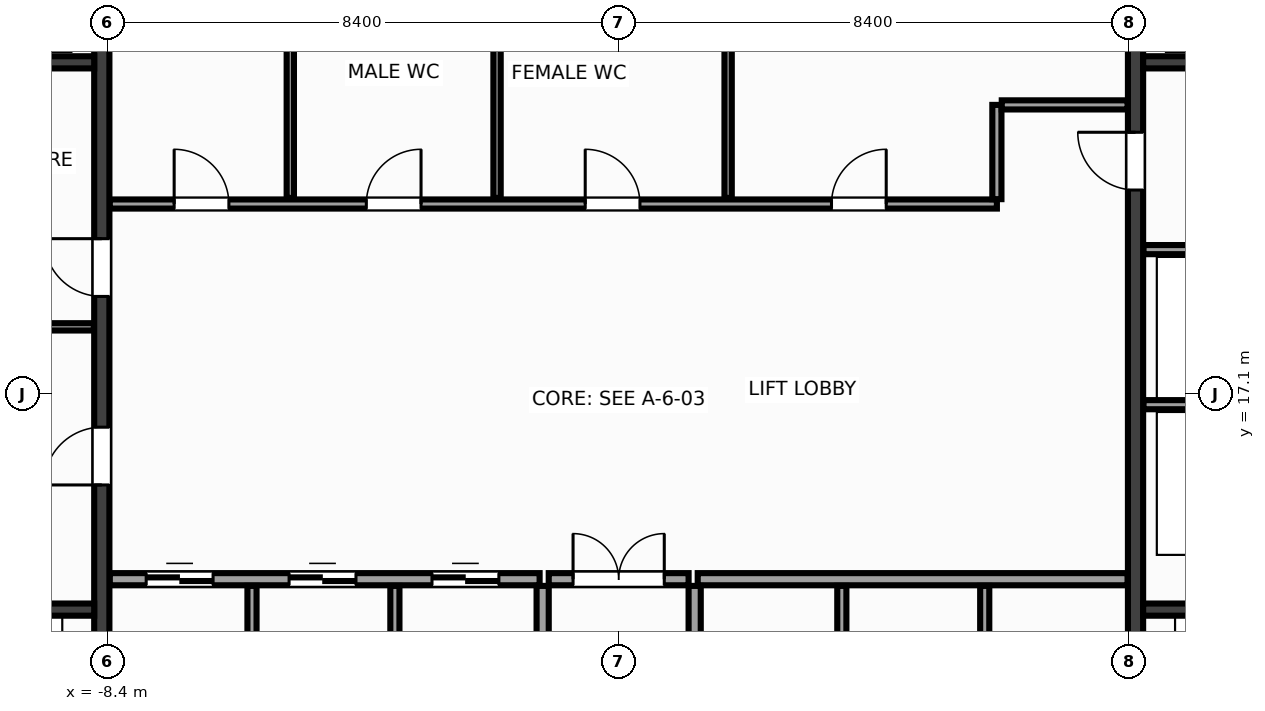
"""IFC4 building model, lengths in metres.
Left out: names, types, materials, properties, quantities, classifications, styles, units other than length and angle.
Written with IfcOpenShell. Run it as: python <this file> out.ifc"""

import sys

from ifc_helpers import new_model, si_unit, direction, frame, frame_2d, origin, place, context, subcontext, project, spatial, rectangle, extrude, source, transform, mapped, element, fill, save


model = new_model("IFC4")
c1 = context("Model", 3, precision=1e-05, world=origin(), true_north=direction((0.0, 1.0)))
c2 = subcontext(c1, "Body", "Model", "MODEL_VIEW")
j1 = project(units=[si_unit("LENGTHUNIT", "METRE"), si_unit("PLANEANGLEUNIT", "RADIAN")], contexts=[c1])
p1 = place(None, origin())
s1 = spatial("IfcSite", under=j1, at=p1, CompositionType="ELEMENT")
p2 = place(p1, origin())
s2 = spatial("IfcBuilding", under=s1, at=p2, CompositionType="ELEMENT")
p3 = place(p2, frame((0.0, 0.0, 38.0)))
s3 = spatial("IfcBuildingStorey", under=s2, at=p3, CompositionType="ELEMENT", Elevation=38.0)
m1 = source(origin(), c2, "Body", "SweptSolid", [
    extrude(rectangle(XDim=12.8, YDim=0.25, at=frame_2d((6.4, 0.0))), origin(), (0.0, 0.0, 1.0), 3.6),
])
p4 = place(p3, frame((-8.5, 10.6, 0.0), z_axis=(0.0, 0.0, 1.0), x_axis=(0.0, 1.0, 0.0)))
e1 = element("IfcWall", 1, at=p4, inside=s3, PredefinedType="SHEAR", context=c2, shape_type="MappedRepresentation", body=[
    mapped(m1, transform((0.0, 0.0, 0.0), x_axis=(1.0, 0.0, 0.0), y_axis=(0.0, 1.0, 0.0), z_axis=(0.0, 0.0, 1.0), scale=1.0)),
])
p5 = place(p4, frame((5.0, 0.0, 0.0)))
e2 = element("IfcOpeningElement", 2, at=p5, cuts=e1, PredefinedType="OPENING", context=c2, shape_type="SweptSolid", body=[
    extrude(rectangle(XDim=0.95, YDim=2.15, at=frame_2d((0.475, 1.075))), frame((0.0, 0.137, 0.0), z_axis=(0.0, -1.0, 0.0), x_axis=(1.0, 0.0, 0.0)), (0.0, 0.0, 1.0), 0.274),
])
p6 = place(p4, frame((8.1, 0.0, 0.0)))
e3 = element("IfcOpeningElement", 3, at=p6, cuts=e1, PredefinedType="OPENING", context=c2, shape_type="SweptSolid", body=[
    extrude(rectangle(XDim=0.95, YDim=2.15, at=frame_2d((0.475, 1.075))), frame((0.0, 0.137, 0.0), z_axis=(0.0, -1.0, 0.0), x_axis=(1.0, 0.0, 0.0)), (0.0, 0.0, 1.0), 0.274),
])
p7 = place(p3, frame((8.5, 10.6, 0.0), z_axis=(0.0, 0.0, 1.0), x_axis=(0.0, 1.0, 0.0)))
e4 = element("IfcWall", 4, at=p7, inside=s3, PredefinedType="SHEAR", context=c2, shape_type="MappedRepresentation", body=[
    mapped(m1, transform((0.0, 0.0, 0.0), x_axis=(1.0, 0.0, 0.0), y_axis=(0.0, 1.0, 0.0), z_axis=(0.0, 0.0, 1.0), scale=1.0)),
])
p8 = place(p7, frame((9.85, 0.0, 0.0)))
e5 = element("IfcOpeningElement", 5, at=p8, cuts=e4, PredefinedType="OPENING", context=c2, shape_type="SweptSolid", body=[
    extrude(rectangle(XDim=0.95, YDim=2.15, at=frame_2d((0.475, 1.075))), frame((0.0, 0.137, 0.0), z_axis=(0.0, -1.0, 0.0), x_axis=(1.0, 0.0, 0.0)), (0.0, 0.0, 1.0), 0.274),
])
m2 = source(origin(), c2, "Body", "SweptSolid", [
    extrude(rectangle(XDim=2.825, YDim=0.2, at=frame_2d((1.413, 0.0))), origin(), (0.0, 0.0, 1.0), 3.6),
])
for number, where, z_axis, x_axis in (
    (6, (-11.45, 13.55, 0.0), (0.0, 0.0, 1.0), (1.0, 0.0, 0.0)),
    (7, (8.625, 13.55, 0.0), (0.0, 0.0, 1.0), (1.0, 0.0, 0.0)),
):
    element("IfcWall", number, at=place(p3, frame(where, z_axis=z_axis, x_axis=x_axis)), inside=s3, PredefinedType="SHEAR", context=c2, shape_type="MappedRepresentation", body=[
        mapped(m2, transform((0.0, 0.0, 0.0), x_axis=(1.0, 0.0, 0.0), y_axis=(0.0, 1.0, 0.0), z_axis=(0.0, 0.0, 1.0), scale=1.0)),
    ])
m3 = source(origin(), c2, "Body", "SweptSolid", [
    extrude(rectangle(XDim=3.02, YDim=0.2, at=frame_2d((1.51, 0.0))), origin(), (0.0, 0.0, 1.0), 3.6),
])
for number, where, z_axis, x_axis in (
    (8, (-11.645, 22.55, 0.0), (0.0, 0.0, 1.0), (1.0, 0.0, 0.0)),
    (9, (8.625, 22.55, 0.0), (0.0, 0.0, 1.0), (1.0, 0.0, 0.0)),
):
    element("IfcWall", number, at=place(p3, frame(where, z_axis=z_axis, x_axis=x_axis)), inside=s3, PredefinedType="SHEAR", context=c2, shape_type="MappedRepresentation", body=[
        mapped(m3, transform((0.0, 0.0, 0.0), x_axis=(1.0, 0.0, 0.0), y_axis=(0.0, 1.0, 0.0), z_axis=(0.0, 0.0, 1.0), scale=1.0)),
    ])
m4 = source(origin(), c2, "Body", "SweptSolid", [
    extrude(rectangle(XDim=3.01, YDim=0.12, at=frame_2d((1.505, 0.0))), origin(), (0.0, 0.0, 1.0), 3.36),
])
p9 = place(p3, frame((-11.64, 18.2, 0.0), z_axis=(0.0, 0.0, 1.0), x_axis=(1.0, 0.0, 0.0)))
e10 = element("IfcWall", 10, at=p9, inside=s3, PredefinedType="PARTITIONING", context=c2, shape_type="MappedRepresentation", body=[
    mapped(m4, transform((0.0, 0.0, 0.0), x_axis=(1.0, 0.0, 0.0), y_axis=(0.0, 1.0, 0.0), z_axis=(0.0, 0.0, 1.0), scale=1.0)),
])
m5 = source(origin(), c2, "Body", "SweptSolid", [
    extrude(rectangle(XDim=3.01, YDim=0.15, at=frame_2d((1.505, 0.0))), origin(), (0.0, 0.0, 1.0), 3.36),
])
for number, where, z_axis, x_axis in (
    (11, (8.63, 16.92, 0.0), (0.0, 0.0, 1.0), (1.0, 0.0, 0.0)),
    (12, (8.63, 19.47, 0.0), (0.0, 0.0, 1.0), (1.0, 0.0, 0.0)),
):
    element("IfcWall", number, at=place(p3, frame(where, z_axis=z_axis, x_axis=x_axis)), inside=s3, PredefinedType="PARTITIONING", context=c2, shape_type="MappedRepresentation", body=[
        mapped(m5, transform((0.0, 0.0, 0.0), x_axis=(1.0, 0.0, 0.0), y_axis=(0.0, 1.0, 0.0), z_axis=(0.0, 0.0, 1.0), scale=1.0)),
    ])
m6 = source(origin(), c2, "Body", "SweptSolid", [
    extrude(rectangle(XDim=7.07, YDim=0.2, at=frame_2d((3.535, 0.0))), origin(), (0.0, 0.0, 1.0), 3.36),
])
p10 = place(p3, frame((-8.37, 14.05, 0.0), z_axis=(0.0, 0.0, 1.0), x_axis=(1.0, 0.0, 0.0)))
e13 = element("IfcWall", 13, at=p10, inside=s3, PredefinedType="PARTITIONING", context=c2, shape_type="MappedRepresentation", body=[
    mapped(m6, transform((0.0, 0.0, 0.0), x_axis=(1.0, 0.0, 0.0), y_axis=(0.0, 1.0, 0.0), z_axis=(0.0, 0.0, 1.0), scale=1.0)),
])
p11 = place(p10, frame((0.6, 0.0, 0.0)))
e14 = element("IfcOpeningElement", 14, at=p11, cuts=e13, PredefinedType="OPENING", context=c2, shape_type="SweptSolid", body=[
    extrude(rectangle(XDim=1.1, YDim=2.15, at=frame_2d((0.55, 1.075))), frame((0.0, 0.112, 0.0), z_axis=(0.0, -1.0, 0.0), x_axis=(1.0, 0.0, 0.0)), (0.0, 0.0, 1.0), 0.224),
])
p12 = place(p10, frame((2.95, 0.0, 0.0)))
e15 = element("IfcOpeningElement", 15, at=p12, cuts=e13, PredefinedType="OPENING", context=c2, shape_type="SweptSolid", body=[
    extrude(rectangle(XDim=1.1, YDim=2.15, at=frame_2d((0.55, 1.075))), frame((0.0, 0.112, 0.0), z_axis=(0.0, -1.0, 0.0), x_axis=(1.0, 0.0, 0.0)), (0.0, 0.0, 1.0), 0.224),
])
p13 = place(p10, frame((5.3, 0.0, 0.0)))
e16 = element("IfcOpeningElement", 16, at=p13, cuts=e13, PredefinedType="OPENING", context=c2, shape_type="SweptSolid", body=[
    extrude(rectangle(XDim=1.1, YDim=2.15, at=frame_2d((0.55, 1.075))), frame((0.0, 0.112, 0.0), z_axis=(0.0, -1.0, 0.0), x_axis=(1.0, 0.0, 0.0)), (0.0, 0.0, 1.0), 0.224),
])
p14 = place(p3, frame((1.3, 14.05, 0.0), z_axis=(0.0, 0.0, 1.0), x_axis=(1.0, 0.0, 0.0)))
e17 = element("IfcWall", 17, at=p14, inside=s3, PredefinedType="PARTITIONING", context=c2, shape_type="MappedRepresentation", body=[
    mapped(m6, transform((0.0, 0.0, 0.0), x_axis=(1.0, 0.0, 0.0), y_axis=(0.0, 1.0, 0.0), z_axis=(0.0, 0.0, 1.0), scale=1.0)),
])
m7 = source(origin(), c2, "Body", "SweptSolid", [
    extrude(rectangle(XDim=3.34, YDim=0.2, at=frame_2d((1.67, 0.0))), origin(), (0.0, 0.0, 1.0), 3.36),
])
for number, where, z_axis, x_axis in (
    (18, (-1.25, 10.6, 0.0), (0.0, 0.0, 1.0), (0.0, 1.0, 0.0)),
    (19, (1.25, 10.6, 0.0), (0.0, 0.0, 1.0), (0.0, 1.0, 0.0)),
):
    element("IfcWall", number, at=place(p3, frame(where, z_axis=z_axis, x_axis=x_axis)), inside=s3, PredefinedType="PARTITIONING", context=c2, shape_type="MappedRepresentation", body=[
        mapped(m7, transform((0.0, 0.0, 0.0), x_axis=(1.0, 0.0, 0.0), y_axis=(0.0, 1.0, 0.0), z_axis=(0.0, 0.0, 1.0), scale=1.0)),
    ])
m8 = source(origin(), c2, "Body", "SweptSolid", [
    extrude(rectangle(XDim=2.3, YDim=0.2, at=frame_2d((1.15, 0.0))), origin(), (0.0, 0.0, 1.0), 3.36),
])
p15 = place(p3, frame((-1.15, 14.05, 0.0), z_axis=(0.0, 0.0, 1.0), x_axis=(1.0, 0.0, 0.0)))
e20 = element("IfcWall", 20, at=p15, inside=s3, PredefinedType="PARTITIONING", context=c2, shape_type="MappedRepresentation", body=[
    mapped(m8, transform((0.0, 0.0, 0.0), x_axis=(1.0, 0.0, 0.0), y_axis=(0.0, 1.0, 0.0), z_axis=(0.0, 0.0, 1.0), scale=1.0)),
])
p16 = place(p15, frame((0.4, 0.0, 0.0)))
e21 = element("IfcOpeningElement", 21, at=p16, cuts=e20, PredefinedType="OPENING", context=c2, shape_type="SweptSolid", body=[
    extrude(rectangle(XDim=1.5, YDim=2.2, at=frame_2d((0.75, 1.1))), frame((0.0, 0.112, 0.0), z_axis=(0.0, -1.0, 0.0), x_axis=(1.0, 0.0, 0.0)), (0.0, 0.0, 1.0), 0.224),
])
m9 = source(origin(), c2, "Body", "SweptSolid", [
    extrude(rectangle(XDim=14.59, YDim=0.15, at=frame_2d((7.295, 0.0))), origin(), (0.0, 0.0, 1.0), 3.36),
])
p17 = place(p3, frame((-8.37, 20.22, 0.0), z_axis=(0.0, 0.0, 1.0), x_axis=(1.0, 0.0, 0.0)))
e22 = element("IfcWall", 22, at=p17, inside=s3, PredefinedType="PARTITIONING", context=c2, shape_type="MappedRepresentation", body=[
    mapped(m9, transform((0.0, 0.0, 0.0), x_axis=(1.0, 0.0, 0.0), y_axis=(0.0, 1.0, 0.0), z_axis=(0.0, 0.0, 1.0), scale=1.0)),
])
p18 = place(p17, frame((1.06, 0.0, 0.0)))
e23 = element("IfcOpeningElement", 23, at=p18, cuts=e22, PredefinedType="OPENING", context=c2, shape_type="SweptSolid", body=[
    extrude(rectangle(XDim=0.9, YDim=2.15, at=frame_2d((0.45, 1.075))), frame((0.0, 0.087, 0.0), z_axis=(0.0, -1.0, 0.0), x_axis=(1.0, 0.0, 0.0)), (0.0, 0.0, 1.0), 0.174),
])
p19 = place(p17, frame((4.22, 0.0, 0.0)))
e24 = element("IfcOpeningElement", 24, at=p19, cuts=e22, PredefinedType="OPENING", context=c2, shape_type="SweptSolid", body=[
    extrude(rectangle(XDim=0.9, YDim=2.15, at=frame_2d((0.45, 1.075))), frame((0.0, 0.087, 0.0), z_axis=(0.0, -1.0, 0.0), x_axis=(1.0, 0.0, 0.0)), (0.0, 0.0, 1.0), 0.174),
])
p20 = place(p17, frame((7.82, 0.0, 0.0)))
e25 = element("IfcOpeningElement", 25, at=p20, cuts=e22, PredefinedType="OPENING", context=c2, shape_type="SweptSolid", body=[
    extrude(rectangle(XDim=0.9, YDim=2.15, at=frame_2d((0.45, 1.075))), frame((0.0, 0.087, 0.0), z_axis=(0.0, -1.0, 0.0), x_axis=(1.0, 0.0, 0.0)), (0.0, 0.0, 1.0), 0.174),
])
p21 = place(p17, frame((11.87, 0.0, 0.0)))
e26 = element("IfcOpeningElement", 26, at=p21, cuts=e22, PredefinedType="OPENING", context=c2, shape_type="SweptSolid", body=[
    extrude(rectangle(XDim=0.9, YDim=2.15, at=frame_2d((0.45, 1.075))), frame((0.0, 0.087, 0.0), z_axis=(0.0, -1.0, 0.0), x_axis=(1.0, 0.0, 0.0)), (0.0, 0.0, 1.0), 0.174),
])
m10 = source(origin(), c2, "Body", "SweptSolid", [
    extrude(rectangle(XDim=1.55, YDim=0.15, at=frame_2d((0.775, 0.0))), origin(), (0.0, 0.0, 1.0), 3.36),
])
p22 = place(p3, frame((6.22, 20.3, 0.0), z_axis=(0.0, 0.0, 1.0), x_axis=(0.0, 1.0, 0.0)))
e27 = element("IfcWall", 27, at=p22, inside=s3, PredefinedType="PARTITIONING", context=c2, shape_type="MappedRepresentation", body=[
    mapped(m10, transform((0.0, 0.0, 0.0), x_axis=(1.0, 0.0, 0.0), y_axis=(0.0, 1.0, 0.0), z_axis=(0.0, 0.0, 1.0), scale=1.0)),
])
m11 = source(origin(), c2, "Body", "SweptSolid", [
    extrude(rectangle(XDim=2.07, YDim=0.15, at=frame_2d((1.035, 0.0))), origin(), (0.0, 0.0, 1.0), 3.36),
])
p23 = place(p3, frame((6.3, 21.85, 0.0), z_axis=(0.0, 0.0, 1.0), x_axis=(1.0, 0.0, 0.0)))
e28 = element("IfcWall", 28, at=p23, inside=s3, PredefinedType="PARTITIONING", context=c2, shape_type="MappedRepresentation", body=[
    mapped(m11, transform((0.0, 0.0, 0.0), x_axis=(1.0, 0.0, 0.0), y_axis=(0.0, 1.0, 0.0), z_axis=(0.0, 0.0, 1.0), scale=1.0)),
])
m12 = source(origin(), c2, "Body", "SweptSolid", [
    extrude(rectangle(XDim=3.34, YDim=0.15, at=frame_2d((1.67, 0.0))), origin(), (0.0, 0.0, 1.0), 3.36),
])
for number, where, z_axis, x_axis in (
    (29, (-6.03, 10.6, 0.0), (0.0, 0.0, 1.0), (0.0, 1.0, 0.0)),
    (30, (-3.68, 10.6, 0.0), (0.0, 0.0, 1.0), (0.0, 1.0, 0.0)),
    (31, (3.67, 10.6, 0.0), (0.0, 0.0, 1.0), (0.0, 1.0, 0.0)),
    (32, (6.02, 10.6, 0.0), (0.0, 0.0, 1.0), (0.0, 1.0, 0.0)),
):
    element("IfcWall", number, at=place(p3, frame(where, z_axis=z_axis, x_axis=x_axis)), inside=s3, PredefinedType="PARTITIONING", context=c2, shape_type="MappedRepresentation", body=[
        mapped(m12, transform((0.0, 0.0, 0.0), x_axis=(1.0, 0.0, 0.0), y_axis=(0.0, 1.0, 0.0), z_axis=(0.0, 0.0, 1.0), scale=1.0)),
    ])
m13 = source(origin(), c2, "Body", "SweptSolid", [
    extrude(rectangle(XDim=3.04, YDim=0.12, at=frame_2d((1.52, 0.0))), origin(), (0.0, 0.0, 1.0), 3.36),
])
for number, where, z_axis, x_axis in (
    (33, (-5.4, 20.32, 0.0), (0.0, 0.0, 1.0), (0.0, 1.0, 0.0)),
    (34, (-2.0, 20.32, 0.0), (0.0, 0.0, 1.0), (0.0, 1.0, 0.0)),
    (35, (1.8, 20.32, 0.0), (0.0, 0.0, 1.0), (0.0, 1.0, 0.0)),
):
    element("IfcWall", number, at=place(p3, frame(where, z_axis=z_axis, x_axis=x_axis)), inside=s3, PredefinedType="PARTITIONING", context=c2, shape_type="MappedRepresentation", body=[
        mapped(m13, transform((0.0, 0.0, 0.0), x_axis=(1.0, 0.0, 0.0), y_axis=(0.0, 1.0, 0.0), z_axis=(0.0, 0.0, 1.0), scale=1.0)),
    ])
m14 = source(origin(), c2, "Body", "SweptSolid", [
    extrude(rectangle(XDim=0.95, YDim=2.15, at=frame_2d((0.475, 1.075))), frame((0.0, 0.025, 0.0), z_axis=(0.0, -1.0, 0.0), x_axis=(1.0, 0.0, 0.0)), (0.0, 0.0, 1.0), 0.05),
])
p24 = place(p5, origin())
e36 = element("IfcDoor", 36, at=p24, inside=s3, OperationType="SINGLE_SWING_LEFT", PredefinedType="DOOR", context=c2, shape_type="MappedRepresentation", body=[
    mapped(m14, transform((0.0, 0.0, 0.0), x_axis=(1.0, 0.0, 0.0), y_axis=(0.0, 1.0, 0.0), z_axis=(0.0, 0.0, 1.0), scale=1.0)),
])
fill(e2, e36)
p25 = place(p6, origin())
e37 = element("IfcDoor", 37, at=p25, inside=s3, OperationType="SINGLE_SWING_RIGHT", PredefinedType="DOOR", context=c2, shape_type="MappedRepresentation", body=[
    mapped(m14, transform((0.0, 0.0, 0.0), x_axis=(1.0, 0.0, 0.0), y_axis=(0.0, 1.0, 0.0), z_axis=(0.0, 0.0, 1.0), scale=1.0)),
])
fill(e3, e37)
m15 = source(origin(), c2, "Body", "SweptSolid", [
    extrude(rectangle(XDim=0.95, YDim=2.15, at=frame_2d((0.475, 1.075))), frame((0.0, 0.025, 0.0), z_axis=(0.0, -1.0, 0.0), x_axis=(1.0, 0.0, 0.0)), (0.0, 0.0, 1.0), 0.05),
])
p26 = place(p8, origin())
e38 = element("IfcDoor", 38, at=p26, inside=s3, OperationType="SINGLE_SWING_RIGHT", PredefinedType="DOOR", context=c2, shape_type="MappedRepresentation", body=[
    mapped(m15, transform((0.0, 0.0, 0.0), x_axis=(1.0, 0.0, 0.0), y_axis=(0.0, 1.0, 0.0), z_axis=(0.0, 0.0, 1.0), scale=1.0)),
])
fill(e5, e38)
m16 = source(origin(), c2, "Body", "SweptSolid", [
    extrude(rectangle(XDim=1.1, YDim=2.15, at=frame_2d((0.55, 1.075))), frame((0.0, 0.025, 0.0), z_axis=(0.0, -1.0, 0.0), x_axis=(1.0, 0.0, 0.0)), (0.0, 0.0, 1.0), 0.05),
])
p27 = place(p11, origin())
e39 = element("IfcDoor", 39, at=p27, inside=s3, OperationType="DOUBLE_DOOR_SLIDING", PredefinedType="DOOR", context=c2, shape_type="MappedRepresentation", body=[
    mapped(m16, transform((0.0, 0.0, 0.0), x_axis=(1.0, 0.0, 0.0), y_axis=(0.0, 1.0, 0.0), z_axis=(0.0, 0.0, 1.0), scale=1.0)),
])
fill(e14, e39)
p28 = place(p12, origin())
e40 = element("IfcDoor", 40, at=p28, inside=s3, OperationType="DOUBLE_DOOR_SLIDING", PredefinedType="DOOR", context=c2, shape_type="MappedRepresentation", body=[
    mapped(m16, transform((0.0, 0.0, 0.0), x_axis=(1.0, 0.0, 0.0), y_axis=(0.0, 1.0, 0.0), z_axis=(0.0, 0.0, 1.0), scale=1.0)),
])
fill(e15, e40)
p29 = place(p13, origin())
e41 = element("IfcDoor", 41, at=p29, inside=s3, OperationType="DOUBLE_DOOR_SLIDING", PredefinedType="DOOR", context=c2, shape_type="MappedRepresentation", body=[
    mapped(m16, transform((0.0, 0.0, 0.0), x_axis=(1.0, 0.0, 0.0), y_axis=(0.0, 1.0, 0.0), z_axis=(0.0, 0.0, 1.0), scale=1.0)),
])
fill(e16, e41)
m17 = source(origin(), c2, "Body", "SweptSolid", [
    extrude(rectangle(XDim=1.5, YDim=2.2, at=frame_2d((0.75, 1.1))), frame((0.0, 0.025, 0.0), z_axis=(0.0, -1.0, 0.0), x_axis=(1.0, 0.0, 0.0)), (0.0, 0.0, 1.0), 0.05),
])
p30 = place(p16, origin())
e42 = element("IfcDoor", 42, at=p30, inside=s3, OperationType="DOUBLE_DOOR_SINGLE_SWING", PredefinedType="DOOR", context=c2, shape_type="MappedRepresentation", body=[
    mapped(m17, transform((0.0, 0.0, 0.0), x_axis=(1.0, 0.0, 0.0), y_axis=(0.0, 1.0, 0.0), z_axis=(0.0, 0.0, 1.0), scale=1.0)),
])
fill(e21, e42)
m18 = source(origin(), c2, "Body", "SweptSolid", [
    extrude(rectangle(XDim=0.9, YDim=2.15, at=frame_2d((0.45, 1.075))), frame((0.0, 0.025, 0.0), z_axis=(0.0, -1.0, 0.0), x_axis=(1.0, 0.0, 0.0)), (0.0, 0.0, 1.0), 0.05),
])
p31 = place(p18, origin())
e43 = element("IfcDoor", 43, at=p31, inside=s3, OperationType="SINGLE_SWING_LEFT", PredefinedType="DOOR", context=c2, shape_type="MappedRepresentation", body=[
    mapped(m18, transform((0.0, 0.0, 0.0), x_axis=(1.0, 0.0, 0.0), y_axis=(0.0, 1.0, 0.0), z_axis=(0.0, 0.0, 1.0), scale=1.0)),
])
fill(e23, e43)
p32 = place(p19, origin())
e44 = element("IfcDoor", 44, at=p32, inside=s3, OperationType="SINGLE_SWING_RIGHT", PredefinedType="DOOR", context=c2, shape_type="MappedRepresentation", body=[
    mapped(m18, transform((0.0, 0.0, 0.0), x_axis=(1.0, 0.0, 0.0), y_axis=(0.0, 1.0, 0.0), z_axis=(0.0, 0.0, 1.0), scale=1.0)),
])
fill(e24, e44)
p33 = place(p20, origin())
e45 = element("IfcDoor", 45, at=p33, inside=s3, OperationType="SINGLE_SWING_LEFT", PredefinedType="DOOR", context=c2, shape_type="MappedRepresentation", body=[
    mapped(m18, transform((0.0, 0.0, 0.0), x_axis=(1.0, 0.0, 0.0), y_axis=(0.0, 1.0, 0.0), z_axis=(0.0, 0.0, 1.0), scale=1.0)),
])
fill(e25, e45)
p34 = place(p21, origin())
e46 = element("IfcDoor", 46, at=p34, inside=s3, OperationType="SINGLE_SWING_RIGHT", PredefinedType="DOOR", context=c2, shape_type="MappedRepresentation", body=[
    mapped(m18, transform((0.0, 0.0, 0.0), x_axis=(1.0, 0.0, 0.0), y_axis=(0.0, 1.0, 0.0), z_axis=(0.0, 0.0, 1.0), scale=1.0)),
])
fill(e26, e46)
save(model, sys.argv[1])
